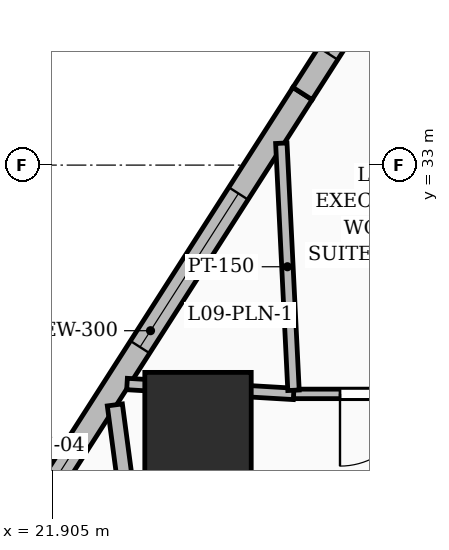
"""IFC4 building model, lengths in metres.
Left out: names, types, materials, properties, quantities, classifications, styles, units other than length and angle.
Written with IfcOpenShell. Run it as: python <this file> out.ifc"""

import sys

from ifc_helpers import new_model, si_unit, direction, frame, frame_2d, origin, origin_2d, place, context, subcontext, project, spatial, rectangle, extrude, element, fill, save


model = new_model("IFC4")
c1 = context("Model", 3, precision=1e-05, world=origin(), true_north=direction((0.0, 1.0)))
c2 = subcontext(c1, "Body", "Model", "MODEL_VIEW")
j1 = project(units=[si_unit("LENGTHUNIT", "METRE"), si_unit("PLANEANGLEUNIT", "RADIAN")], contexts=[c1])
p1 = place(None, origin())
s1 = spatial("IfcSite", under=j1, at=p1, CompositionType="ELEMENT")
p2 = place(p1, origin())
s2 = spatial("IfcBuilding", under=s1, at=p2, CompositionType="ELEMENT")
p3 = place(p2, frame((0.0, 0.0, 42.6)))
s3 = spatial("IfcBuildingStorey", under=s2, at=p3, CompositionType="ELEMENT", Elevation=42.6)
p4 = place(p3, frame((23.822, 29.573, 0.0), z_axis=(0.0, 0.0, 1.0), x_axis=(1.0, 0.0, 0.0)))
e1 = element("IfcColumn", 1, at=p4, inside=s3, PredefinedType="COLUMN", context=c2, shape_type="SweptSolid", body=[
    extrude(rectangle(XDim=1.4, YDim=1.4, at=origin_2d()), origin(), (0.0, 0.0, 1.0), 3.6),
])
p5 = place(p3, frame((21.198, 27.701, 0.0), z_axis=(0.0, 0.0, 1.0), x_axis=(0.539535005594, 0.841963168873, 0.0)))
e2 = element("IfcWall", 2, at=p5, inside=s3, PredefinedType="SOLIDWALL", context=c2, shape_type="SweptSolid", body=[
    extrude(rectangle(XDim=7.412, YDim=0.3, at=frame_2d((3.706, 0.0))), origin(), (0.0, 0.0, 1.0), 3.35),
])
p6 = place(p5, frame((0.675, 0.0, 0.8)))
e3 = element("IfcOpeningElement", 3, at=p6, cuts=e2, PredefinedType="OPENING", context=c2, shape_type="SweptSolid", body=[
    extrude(rectangle(XDim=1.2, YDim=1.8, at=frame_2d((0.6, 0.9))), frame((0.0, 0.16, 0.0), z_axis=(0.0, -1.0, 0.0), x_axis=(1.0, 0.0, 0.0)), (0.0, 0.0, 1.0), 0.32),
])
p7 = place(p5, frame((3.45, 0.0, 0.6)))
e4 = element("IfcOpeningElement", 4, at=p7, cuts=e2, PredefinedType="OPENING", context=c2, shape_type="SweptSolid", body=[
    extrude(rectangle(XDim=2.4, YDim=2.1, at=frame_2d((1.2, 1.05))), frame((0.0, 0.16, 0.0), z_axis=(0.0, -1.0, 0.0), x_axis=(1.0, 0.0, 0.0)), (0.0, 0.0, 1.0), 0.32),
])
p8 = place(p3, frame((25.197, 33.941, 0.0), z_axis=(0.0, 0.0, 1.0), x_axis=(0.539535005594, 0.841963168873, 0.0)))
e5 = element("IfcWall", 5, at=p8, inside=s3, PredefinedType="SOLIDWALL", context=c2, shape_type="SweptSolid", body=[
    extrude(rectangle(XDim=7.412, YDim=0.3, at=frame_2d((3.706, 0.0))), origin(), (0.0, 0.0, 1.0), 3.35),
])
p9 = place(p8, frame((0.625, 0.0, 0.6)))
e6 = element("IfcOpeningElement", 6, at=p9, cuts=e5, PredefinedType="OPENING", context=c2, shape_type="SweptSolid", body=[
    extrude(rectangle(XDim=1.8, YDim=2.1, at=frame_2d((0.9, 1.05))), frame((0.0, 0.16, 0.0), z_axis=(0.0, -1.0, 0.0), x_axis=(1.0, 0.0, 0.0)), (0.0, 0.0, 1.0), 0.32),
])
p10 = place(p3, frame((24.319, 17.834, 0.0), z_axis=(0.0, 0.0, 1.0), x_axis=(-0.131322881858, 0.991339649515, 0.0)))
e7 = element("IfcWall", 7, at=p10, inside=s3, PredefinedType="PARTITIONING", context=c2, shape_type="SweptSolid", body=[
    extrude(rectangle(XDim=12.116, YDim=0.2, at=frame_2d((6.058, 0.0))), origin(), (0.0, 0.0, 1.0), 2.37),
])
p11 = place(p3, frame((27.25, 29.99, 0.0), z_axis=(0.0, 0.0, 1.0), x_axis=(-1.0, 0.0, 0.0)))
e8 = element("IfcWall", 8, at=p11, inside=s3, PredefinedType="PARTITIONING", context=c2, shape_type="SweptSolid", body=[
    extrude(rectangle(XDim=2.17, YDim=0.125, at=frame_2d((1.085, 0.0))), origin(), (0.0, 0.0, 1.0), 3.35),
])
p12 = place(p11, frame((0.61, 0.0, 0.0)))
e9 = element("IfcOpeningElement", 9, at=p12, cuts=e8, PredefinedType="OPENING", context=c2, shape_type="SweptSolid", body=[
    extrude(rectangle(XDim=0.95, YDim=2.2, at=frame_2d((0.475, 1.1))), frame((0.0, 0.072, 0.0), z_axis=(0.0, -1.0, 0.0), x_axis=(1.0, 0.0, 0.0)), (0.0, 0.0, 1.0), 0.145),
])
p13 = place(p3, frame((25.08, 29.99, 0.0), z_axis=(0.0, 0.0, 1.0), x_axis=(-0.998242794365, 0.059256421583, 0.0)))
e10 = element("IfcWall", 10, at=p13, inside=s3, PredefinedType="PARTITIONING", context=c2, shape_type="SweptSolid", body=[
    extrude(rectangle(XDim=2.196, YDim=0.15, at=frame_2d((1.098, 0.0))), origin(), (0.0, 0.0, 1.0), 2.37),
])
p14 = place(p3, frame((24.918, 33.288, 0.0), z_axis=(0.0, 0.0, 1.0), x_axis=(0.04928658055, -0.998784677985, 0.0)))
e11 = element("IfcWall", 11, at=p14, inside=s3, PredefinedType="PARTITIONING", context=c2, shape_type="SweptSolid", body=[
    extrude(rectangle(XDim=3.254, YDim=0.15, at=frame_2d((1.627, 0.0))), origin(), (0.0, 0.0, 1.0), 2.37),
])
p15 = place(p6, origin())
e12 = element("IfcWindow", 12, at=p15, inside=s3, PartitioningType="SINGLE_PANEL", PredefinedType="WINDOW", context=c2, shape_type="SweptSolid", body=[
    extrude(rectangle(XDim=1.2, YDim=1.8, at=frame_2d((0.6, 0.9))), frame((0.0, 0.03, 0.0), z_axis=(0.0, -1.0, 0.0), x_axis=(1.0, 0.0, 0.0)), (0.0, 0.0, 1.0), 0.06),
])
fill(e3, e12)
p16 = place(p7, origin())
e13 = element("IfcWindow", 13, at=p16, inside=s3, PartitioningType="SINGLE_PANEL", PredefinedType="WINDOW", context=c2, shape_type="SweptSolid", body=[
    extrude(rectangle(XDim=2.4, YDim=2.1, at=frame_2d((1.2, 1.05))), frame((0.0, 0.03, 0.0), z_axis=(0.0, -1.0, 0.0), x_axis=(1.0, 0.0, 0.0)), (0.0, 0.0, 1.0), 0.06),
])
fill(e4, e13)
p17 = place(p9, origin())
e14 = element("IfcWindow", 14, at=p17, inside=s3, PartitioningType="SINGLE_PANEL", PredefinedType="WINDOW", context=c2, shape_type="SweptSolid", body=[
    extrude(rectangle(XDim=1.8, YDim=2.1, at=frame_2d((0.9, 1.05))), frame((0.0, 0.03, 0.0), z_axis=(0.0, -1.0, 0.0), x_axis=(1.0, 0.0, 0.0)), (0.0, 0.0, 1.0), 0.06),
])
fill(e6, e14)
p18 = place(p12, origin())
e15 = element("IfcDoor", 15, at=p18, inside=s3, OperationType="SINGLE_SWING_RIGHT", PredefinedType="DOOR", context=c2, shape_type="SweptSolid", body=[
    extrude(rectangle(XDim=0.95, YDim=2.2, at=frame_2d((0.475, 1.1))), frame((0.0, 0.025, 0.0), z_axis=(0.0, -1.0, 0.0), x_axis=(1.0, 0.0, 0.0)), (0.0, 0.0, 1.0), 0.05),
])
fill(e9, e15)
save(model, sys.argv[1])
